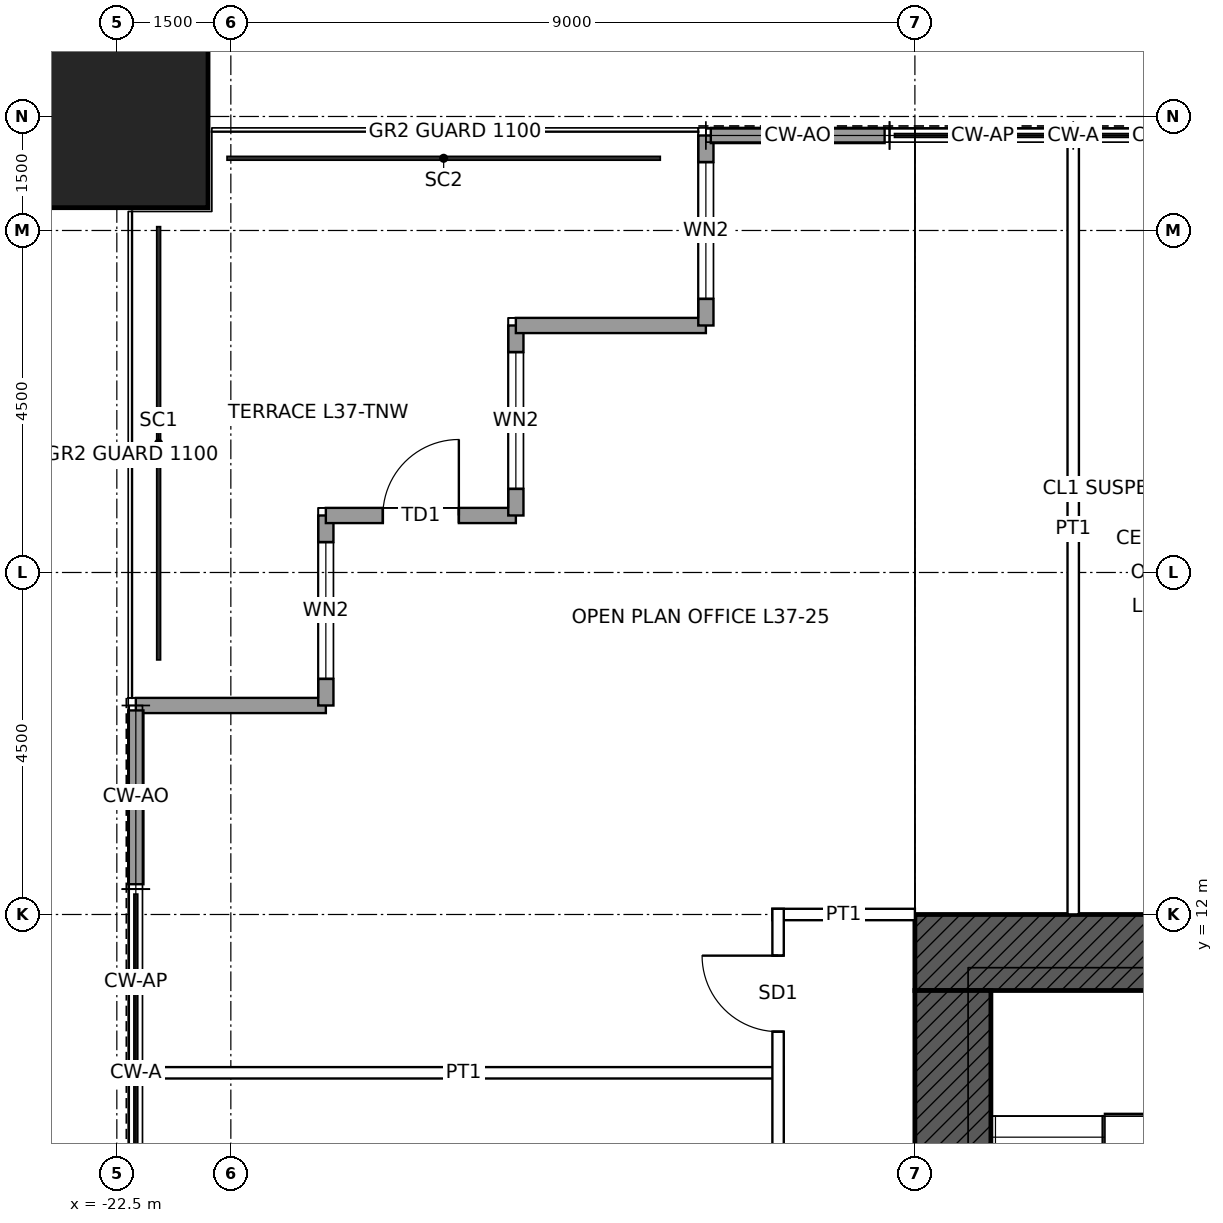
"""IFC4 building model, lengths in metres.
Left out: names, types, materials, properties, quantities, classifications, styles, units other than length and angle.
Written with IfcOpenShell. Run it as: python <this file> out.ifc"""

import sys

from ifc_helpers import new_model, si_unit, direction, frame, frame_2d, origin, origin_2d, place, context, subcontext, project, spatial, rectangle, hollow_rectangle, extrude, element, fill, save


model = new_model("IFC4")
c1 = context("Model", 3, precision=1e-05, world=origin(), true_north=direction((0.0, 1.0)))
c2 = subcontext(c1, "Body", "Model", "MODEL_VIEW")
j1 = project(units=[si_unit("LENGTHUNIT", "METRE"), si_unit("PLANEANGLEUNIT", "RADIAN")], contexts=[c1])
p1 = place(None, origin())
s1 = spatial("IfcSite", under=j1, at=p1, CompositionType="ELEMENT")
p2 = place(p1, origin())
s2 = spatial("IfcBuilding", under=s1, at=p2, CompositionType="ELEMENT")
p3 = place(p2, frame((0.0, 0.0, 181.9)))
s3 = spatial("IfcBuildingStorey", under=s2, at=p3, CompositionType="ELEMENT", Elevation=181.9)
p4 = place(p3, frame((-22.5, 22.5, 0.0), z_axis=(0.0, 0.0, 1.0), x_axis=(1.0, 0.0, 0.0)))
e1 = element("IfcColumn", 1, at=p4, inside=s3, PredefinedType="COLUMN", context=c2, shape_type="SweptSolid", body=[
    extrude(hollow_rectangle(XDim=2.4, YDim=2.4, WallThickness=0.12, at=origin_2d()), origin(), (0.0, 0.0, 1.0), 4.0),
])
p5 = place(p3, frame((-12.0, 11.5, 0.0), z_axis=(0.0, 0.0, 1.0), x_axis=(1.0, 0.0, 0.0)))
e2 = element("IfcWall", 2, at=p5, inside=s3, PredefinedType="SHEAR", context=c2, shape_type="SweptSolid", body=[
    extrude(rectangle(XDim=24.0, YDim=1.0, at=frame_2d((12.0, 0.0))), origin(), (0.0, 0.0, 1.0), 4.0),
])
p6 = place(p5, frame((6.25, 0.0, 0.0)))
e3 = element("IfcOpeningElement", 3, at=p6, cuts=e2, PredefinedType="OPENING", context=c2, shape_type="SweptSolid", body=[
    extrude(rectangle(XDim=1.0, YDim=2.4, at=frame_2d((0.5, 1.2))), frame((0.0, 0.51, 0.0), z_axis=(0.0, -1.0, 0.0), x_axis=(1.0, 0.0, 0.0)), (0.0, 0.0, 1.0), 1.02),
])
p7 = place(p5, frame((16.75, 0.0, 0.0)))
e4 = element("IfcOpeningElement", 4, at=p7, cuts=e2, PredefinedType="OPENING", context=c2, shape_type="SweptSolid", body=[
    extrude(rectangle(XDim=1.0, YDim=2.4, at=frame_2d((0.5, 1.2))), frame((0.0, 0.51, 0.0), z_axis=(0.0, -1.0, 0.0), x_axis=(1.0, 0.0, 0.0)), (0.0, 0.0, 1.0), 1.02),
])
p8 = place(p3, frame((-11.5, -11.0, 0.0), z_axis=(0.0, 0.0, 1.0), x_axis=(0.0, 1.0, 0.0)))
e5 = element("IfcWall", 5, at=p8, inside=s3, PredefinedType="SHEAR", context=c2, shape_type="SweptSolid", body=[
    extrude(rectangle(XDim=22.0, YDim=1.0, at=frame_2d((11.0, 0.0))), origin(), (0.0, 0.0, 1.0), 4.0),
])
p9 = place(p8, frame((10.5, 0.0, 0.0)))
e6 = element("IfcOpeningElement", 6, at=p9, cuts=e5, PredefinedType="OPENING", context=c2, shape_type="SweptSolid", body=[
    extrude(rectangle(XDim=1.0, YDim=2.4, at=frame_2d((0.5, 1.2))), frame((0.0, 0.51, 0.0), z_axis=(0.0, -1.0, 0.0), x_axis=(1.0, 0.0, 0.0)), (0.0, 0.0, 1.0), 1.02),
])
p10 = place(p3, frame((-22.25, 14.75, 0.0), z_axis=(0.0, 0.0, 1.0), x_axis=(1.0, 0.0, 0.0)))
e7 = element("IfcWall", 7, at=p10, inside=s3, PredefinedType="SOLIDWALL", context=c2, shape_type="SweptSolid", body=[
    extrude(rectangle(XDim=2.5, YDim=0.2, at=frame_2d((1.25, 0.0))), origin(), (0.0, 0.0, 1.0), 3.85),
])
p11 = place(p3, frame((-19.75, 14.75, 0.0), z_axis=(0.0, 0.0, 1.0), x_axis=(0.0, 1.0, 0.0)))
e8 = element("IfcWall", 8, at=p11, inside=s3, PredefinedType="SOLIDWALL", context=c2, shape_type="SweptSolid", body=[
    extrude(rectangle(XDim=2.5, YDim=0.2, at=frame_2d((1.25, 0.0))), origin(), (0.0, 0.0, 1.0), 3.85),
])
p12 = place(p11, frame((0.35, 0.0, 0.3)))
e9 = element("IfcOpeningElement", 9, at=p12, cuts=e8, PredefinedType="OPENING", context=c2, shape_type="SweptSolid", body=[
    extrude(rectangle(XDim=1.8, YDim=2.4, at=frame_2d((0.9, 1.2))), frame((0.0, 0.11, 0.0), z_axis=(0.0, -1.0, 0.0), x_axis=(1.0, 0.0, 0.0)), (0.0, 0.0, 1.0), 0.22),
])
p13 = place(p3, frame((-19.75, 17.25, 0.0), z_axis=(0.0, 0.0, 1.0), x_axis=(1.0, 0.0, 0.0)))
e10 = element("IfcWall", 10, at=p13, inside=s3, PredefinedType="SOLIDWALL", context=c2, shape_type="SweptSolid", body=[
    extrude(rectangle(XDim=2.5, YDim=0.2, at=frame_2d((1.25, 0.0))), origin(), (0.0, 0.0, 1.0), 3.85),
])
p14 = place(p13, frame((0.75, 0.0, 0.0)))
e11 = element("IfcOpeningElement", 11, at=p14, cuts=e10, PredefinedType="OPENING", context=c2, shape_type="SweptSolid", body=[
    extrude(rectangle(XDim=1.0, YDim=2.4, at=frame_2d((0.5, 1.2))), frame((0.0, 0.11, 0.0), z_axis=(0.0, -1.0, 0.0), x_axis=(1.0, 0.0, 0.0)), (0.0, 0.0, 1.0), 0.22),
])
p15 = place(p3, frame((-17.25, 17.25, 0.0), z_axis=(0.0, 0.0, 1.0), x_axis=(0.0, 1.0, 0.0)))
e12 = element("IfcWall", 12, at=p15, inside=s3, PredefinedType="SOLIDWALL", context=c2, shape_type="SweptSolid", body=[
    extrude(rectangle(XDim=2.5, YDim=0.2, at=frame_2d((1.25, 0.0))), origin(), (0.0, 0.0, 1.0), 3.85),
])
p16 = place(p15, frame((0.35, 0.0, 0.3)))
e13 = element("IfcOpeningElement", 13, at=p16, cuts=e12, PredefinedType="OPENING", context=c2, shape_type="SweptSolid", body=[
    extrude(rectangle(XDim=1.8, YDim=2.4, at=frame_2d((0.9, 1.2))), frame((0.0, 0.11, 0.0), z_axis=(0.0, -1.0, 0.0), x_axis=(1.0, 0.0, 0.0)), (0.0, 0.0, 1.0), 0.22),
])
p17 = place(p3, frame((-17.25, 19.75, 0.0), z_axis=(0.0, 0.0, 1.0), x_axis=(1.0, 0.0, 0.0)))
e14 = element("IfcWall", 14, at=p17, inside=s3, PredefinedType="SOLIDWALL", context=c2, shape_type="SweptSolid", body=[
    extrude(rectangle(XDim=2.5, YDim=0.2, at=frame_2d((1.25, 0.0))), origin(), (0.0, 0.0, 1.0), 3.85),
])
p18 = place(p3, frame((-14.75, 19.75, 0.0), z_axis=(0.0, 0.0, 1.0), x_axis=(0.0, 1.0, 0.0)))
e15 = element("IfcWall", 15, at=p18, inside=s3, PredefinedType="SOLIDWALL", context=c2, shape_type="SweptSolid", body=[
    extrude(rectangle(XDim=2.5, YDim=0.2, at=frame_2d((1.25, 0.0))), origin(), (0.0, 0.0, 1.0), 3.85),
])
p19 = place(p18, frame((0.35, 0.0, 0.3)))
e16 = element("IfcOpeningElement", 16, at=p19, cuts=e15, PredefinedType="OPENING", context=c2, shape_type="SweptSolid", body=[
    extrude(rectangle(XDim=1.8, YDim=2.4, at=frame_2d((0.9, 1.2))), frame((0.0, 0.11, 0.0), z_axis=(0.0, -1.0, 0.0), x_axis=(1.0, 0.0, 0.0)), (0.0, 0.0, 1.0), 0.22),
])
for number, where, z_axis, x_axis in (
    (17, (-14.685, 22.25, 0.0), (0.0, 0.0, 1.0), (1.0, 0.0, 0.0)),
    (18, (-22.25, 12.398, 0.0), (0.0, 0.0, 1.0), (0.0, 1.0, 0.0)),
):
    element("IfcWall", number, at=place(p3, frame(where, z_axis=z_axis, x_axis=x_axis)), inside=s3, PredefinedType="SOLIDWALL", context=c2, shape_type="SweptSolid", body=[
        extrude(rectangle(XDim=2.287, YDim=0.2, at=frame_2d((1.144, 0.0))), origin(), (0.0, 0.0, 1.0), 3.85),
    ])
p20 = place(p3, frame((-22.15, 9.917, 0.0), z_axis=(0.0, 0.0, 1.0), x_axis=(1.0, 0.0, 0.0)))
e19 = element("IfcWall", 19, at=p20, inside=s3, PredefinedType="PARTITIONING", context=c2, shape_type="SweptSolid", body=[
    extrude(rectangle(XDim=8.425, YDim=0.15, at=frame_2d((4.212, 0.0))), origin(), (0.0, 0.0, 1.0), 3.85),
])
p21 = place(p3, frame((-13.875, 12.0, 0.0), z_axis=(0.0, 0.0, 1.0), x_axis=(1.0, 0.0, 0.0)))
e20 = element("IfcWall", 20, at=p21, inside=s3, PredefinedType="PARTITIONING", context=c2, shape_type="SweptSolid", body=[
    extrude(rectangle(XDim=1.875, YDim=0.15, at=frame_2d((0.938, 0.0))), origin(), (0.0, 0.0, 1.0), 3.85),
])
p22 = place(p3, frame((-13.8, 4.925, 0.0), z_axis=(0.0, 0.0, 1.0), x_axis=(0.0, 1.0, 0.0)))
e21 = element("IfcWall", 21, at=p22, inside=s3, PredefinedType="PARTITIONING", context=c2, shape_type="SweptSolid", body=[
    extrude(rectangle(XDim=7.15, YDim=0.15, at=frame_2d((3.575, 0.0))), origin(), (0.0, 0.0, 1.0), 3.85),
])
p23 = place(p22, frame((5.533, 0.0, 0.0)))
e22 = element("IfcOpeningElement", 22, at=p23, cuts=e21, PredefinedType="OPENING", context=c2, shape_type="SweptSolid", body=[
    extrude(rectangle(XDim=1.0, YDim=2.4, at=frame_2d((0.5, 1.2))), frame((0.0, 0.085, 0.0), z_axis=(0.0, -1.0, 0.0), x_axis=(1.0, 0.0, 0.0)), (0.0, 0.0, 1.0), 0.17),
])
p24 = place(p3, frame((-9.917, 12.0, 0.0), z_axis=(0.0, 0.0, 1.0), x_axis=(0.0, 1.0, 0.0)))
e23 = element("IfcWall", 23, at=p24, inside=s3, PredefinedType="PARTITIONING", context=c2, shape_type="SweptSolid", body=[
    extrude(rectangle(XDim=10.15, YDim=0.15, at=frame_2d((5.075, 0.0))), origin(), (0.0, 0.0, 1.0), 3.85),
])
p25 = place(p12, origin())
e24 = element("IfcWindow", 24, at=p25, inside=s3, PartitioningType="SINGLE_PANEL", PredefinedType="WINDOW", context=c2, shape_type="SweptSolid", body=[
    extrude(rectangle(XDim=1.8, YDim=2.4, at=frame_2d((0.9, 1.2))), frame((0.0, 0.03, 0.0), z_axis=(0.0, -1.0, 0.0), x_axis=(1.0, 0.0, 0.0)), (0.0, 0.0, 1.0), 0.06),
])
fill(e9, e24)
p26 = place(p14, origin())
e25 = element("IfcDoor", 25, at=p26, inside=s3, OperationType="SINGLE_SWING_RIGHT", PredefinedType="DOOR", context=c2, shape_type="SweptSolid", body=[
    extrude(rectangle(XDim=1.0, YDim=2.4, at=frame_2d((0.5, 1.2))), frame((0.0, 0.025, 0.0), z_axis=(0.0, -1.0, 0.0), x_axis=(1.0, 0.0, 0.0)), (0.0, 0.0, 1.0), 0.05),
])
fill(e11, e25)
p27 = place(p16, origin())
e26 = element("IfcWindow", 26, at=p27, inside=s3, PartitioningType="SINGLE_PANEL", PredefinedType="WINDOW", context=c2, shape_type="SweptSolid", body=[
    extrude(rectangle(XDim=1.8, YDim=2.4, at=frame_2d((0.9, 1.2))), frame((0.0, 0.03, 0.0), z_axis=(0.0, -1.0, 0.0), x_axis=(1.0, 0.0, 0.0)), (0.0, 0.0, 1.0), 0.06),
])
fill(e13, e26)
p28 = place(p19, origin())
e27 = element("IfcWindow", 27, at=p28, inside=s3, PartitioningType="SINGLE_PANEL", PredefinedType="WINDOW", context=c2, shape_type="SweptSolid", body=[
    extrude(rectangle(XDim=1.8, YDim=2.4, at=frame_2d((0.9, 1.2))), frame((0.0, 0.03, 0.0), z_axis=(0.0, -1.0, 0.0), x_axis=(1.0, 0.0, 0.0)), (0.0, 0.0, 1.0), 0.06),
])
fill(e16, e27)
p29 = place(p23, origin())
e28 = element("IfcDoor", 28, at=p29, inside=s3, OperationType="SINGLE_SWING_RIGHT", PredefinedType="DOOR", context=c2, shape_type="SweptSolid", body=[
    extrude(rectangle(XDim=1.0, YDim=2.4, at=frame_2d((0.5, 1.2))), frame((0.0, 0.025, 0.0), z_axis=(0.0, -1.0, 0.0), x_axis=(1.0, 0.0, 0.0)), (0.0, 0.0, 1.0), 0.05),
])
fill(e22, e28)
save(model, sys.argv[1])
